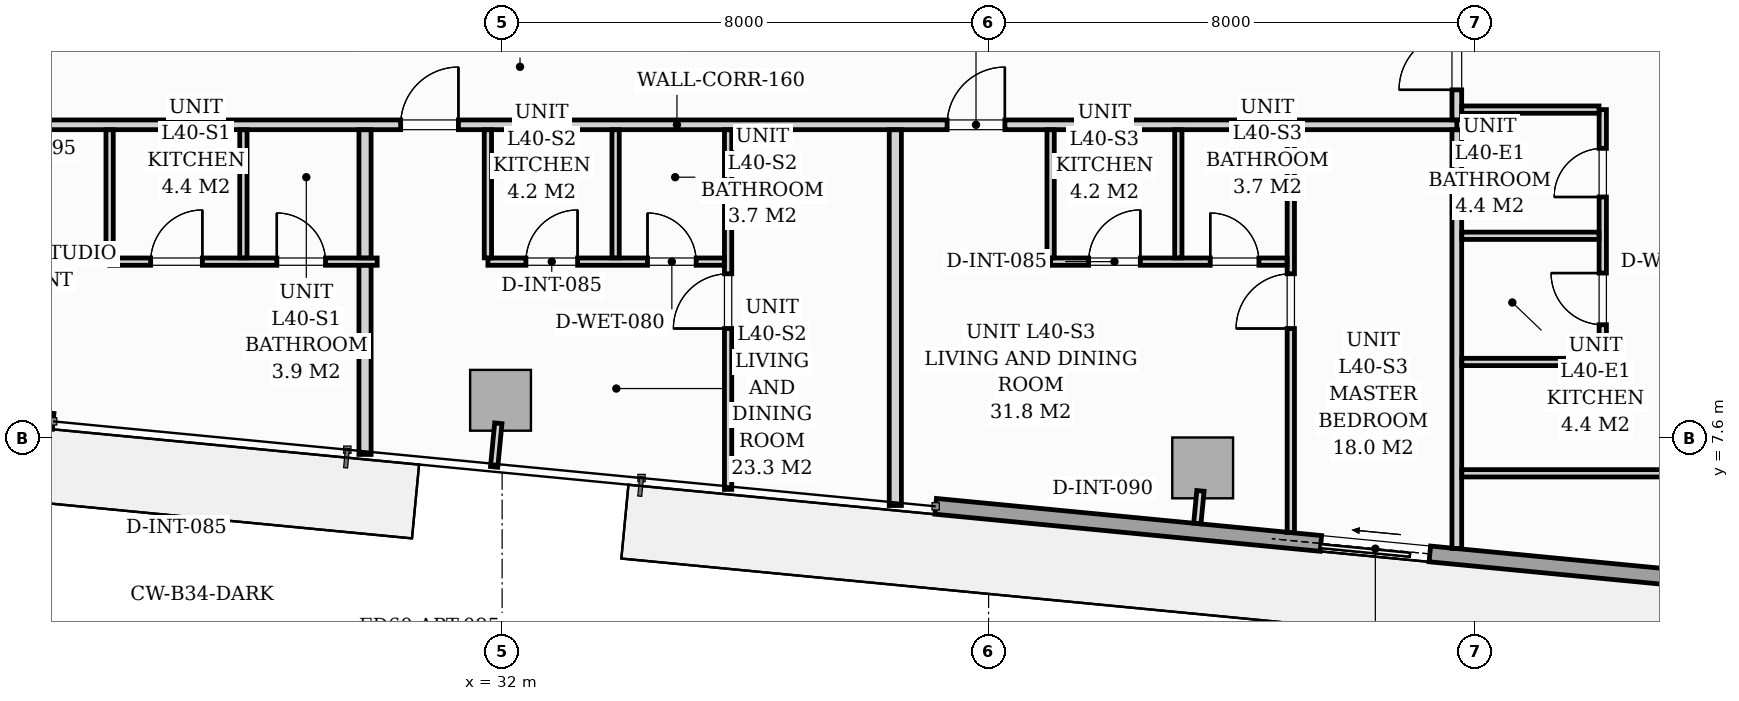
"""IFC4 building model, lengths in metres.
Left out: names, types, materials, properties, quantities, classifications, styles, units other than length and angle.
Written with IfcOpenShell. Run it as: python <this file> out.ifc"""

import sys

from ifc_helpers import new_model, si_unit, direction, frame, frame_2d, origin, origin_2d, place, context, subcontext, project, spatial, rectangle, extrude, source, transform, mapped, element, fill, save


model = new_model("IFC4")
c1 = context("Model", 3, precision=1e-05, world=origin(), true_north=direction((0.0, 1.0)))
c2 = subcontext(c1, "Body", "Model", "MODEL_VIEW")
j1 = project(units=[si_unit("LENGTHUNIT", "METRE"), si_unit("PLANEANGLEUNIT", "RADIAN")], contexts=[c1])
p1 = place(None, origin())
s1 = spatial("IfcSite", under=j1, at=p1, CompositionType="ELEMENT")
p2 = place(p1, origin())
s2 = spatial("IfcBuilding", under=s1, at=p2, CompositionType="ELEMENT")
p3 = place(p2, frame((0.0, 0.0, 140.6)))
s3 = spatial("IfcBuildingStorey", under=s2, at=p3, CompositionType="ELEMENT", Elevation=140.6)
m1 = source(origin(), c2, "Body", "SweptSolid", [
    extrude(rectangle(XDim=1.0, YDim=1.0, at=origin_2d()), origin(), (0.0, 0.0, 1.0), 3.196),
])
for number, where, z_axis, x_axis in (
    (1, (31.974, 8.22, 0.002), (0.0, 0.0, 1.0), (0.995, -0.096, 0.0)),
    (2, (43.521, 7.108, 0.002), (0.0, 0.0, 1.0), (0.995, -0.096, 0.0)),
):
    element("IfcColumn", number, at=place(p3, frame(where, z_axis=z_axis, x_axis=x_axis)), inside=s3, PredefinedType="COLUMN", context=c2, shape_type="MappedRepresentation", body=[
        mapped(m1, transform((0.0, 0.0, 0.0), scale=1.0)),
    ])
p4 = place(p3, frame((56.061, 4.845, 0.0), z_axis=(0.0, 0.0, 1.0), x_axis=(-0.995395976631, 0.095848055311, 0.0)))
e3 = element("IfcWall", 3, at=p4, inside=s3, PredefinedType="STANDARD", context=c2, shape_type="SweptSolid", body=[
    extrude(rectangle(XDim=17.01, YDim=0.26, at=frame_2d((8.505, 0.0))), origin(), (0.0, 0.0, 1.0), 2.94),
])
p5 = place(p4, frame((8.846, 0.0, 0.0)))
e4 = element("IfcOpeningElement", 4, at=p5, cuts=e3, PredefinedType="OPENING", context=c2, shape_type="SweptSolid", body=[
    extrude(rectangle(XDim=1.8, YDim=2.06, at=frame_2d((0.9, 1.03))), frame((0.0, 0.14, 0.0), z_axis=(0.0, -1.0, 0.0), x_axis=(1.0, 0.0, 0.0)), (0.0, 0.0, 1.0), 0.28),
])
p6 = place(p4, frame((2.05, 0.0, 0.65)))
e5 = element("IfcOpeningElement", 5, at=p6, cuts=e3, PredefinedType="OPENING", context=c2, shape_type="SweptSolid", body=[
    extrude(rectangle(XDim=1.6, YDim=1.5, at=frame_2d((0.8, 0.75))), frame((0.0, 0.14, 0.0), z_axis=(0.0, -1.0, 0.0), x_axis=(1.0, 0.0, 0.0)), (0.0, 0.0, 1.0), 0.28),
])
p7 = place(p3, frame((24.617, 7.873, 0.0), z_axis=(0.0, 0.0, 1.0), x_axis=(-0.995395976631, 0.095848055311, 0.0)))
e6 = element("IfcWall", 6, at=p7, inside=s3, PredefinedType="STANDARD", context=c2, shape_type="SweptSolid", body=[
    extrude(rectangle(XDim=17.01, YDim=0.26, at=frame_2d((8.505, 0.0))), origin(), (0.0, 0.0, 1.0), 2.94),
])
p8 = place(p7, frame((7.35, 0.0, 0.0)))
e7 = element("IfcOpeningElement", 7, at=p8, cuts=e6, PredefinedType="OPENING", context=c2, shape_type="SweptSolid", body=[
    extrude(rectangle(XDim=1.8, YDim=2.06, at=frame_2d((0.9, 1.03))), frame((0.0, 0.14, 0.0), z_axis=(0.0, -1.0, 0.0), x_axis=(1.0, 0.0, 0.0)), (0.0, 0.0, 1.0), 0.28),
])
p9 = place(p7, frame((9.7, 0.0, 0.65)))
e8 = element("IfcOpeningElement", 8, at=p9, cuts=e6, PredefinedType="OPENING", context=c2, shape_type="SweptSolid", body=[
    extrude(rectangle(XDim=1.6, YDim=1.5, at=frame_2d((0.8, 0.75))), frame((0.0, 0.14, 0.0), z_axis=(0.0, -1.0, 0.0), x_axis=(1.0, 0.0, 0.0)), (0.0, 0.0, 1.0), 0.28),
])
p10 = place(p3, frame((22.05, 12.75, 0.0), z_axis=(0.0, 0.0, 1.0), x_axis=(1.0, 0.0, 0.0)))
e9 = element("IfcWall", 9, at=p10, inside=s3, PredefinedType="PARTITIONING", context=c2, shape_type="SweptSolid", body=[
    extrude(rectangle(XDim=25.65, YDim=0.16, at=frame_2d((12.825, 0.0))), origin(), (0.0, 0.0, 1.0), 2.94),
])
p11 = place(p10, frame((1.312, 0.0, 0.0)))
e10 = element("IfcOpeningElement", 10, at=p11, cuts=e9, PredefinedType="OPENING", context=c2, shape_type="SweptSolid", body=[
    extrude(rectangle(XDim=0.95, YDim=2.06, at=frame_2d((0.475, 1.03))), frame((0.0, 0.09, 0.0), z_axis=(0.0, -1.0, 0.0), x_axis=(1.0, 0.0, 0.0)), (0.0, 0.0, 1.0), 0.18),
])
p12 = place(p10, frame((8.281, 0.0, 0.0)))
e11 = element("IfcOpeningElement", 11, at=p12, cuts=e9, PredefinedType="OPENING", context=c2, shape_type="SweptSolid", body=[
    extrude(rectangle(XDim=0.95, YDim=2.06, at=frame_2d((0.475, 1.03))), frame((0.0, 0.09, 0.0), z_axis=(0.0, -1.0, 0.0), x_axis=(1.0, 0.0, 0.0)), (0.0, 0.0, 1.0), 0.18),
])
p13 = place(p10, frame((17.268, 0.0, 0.0)))
e12 = element("IfcOpeningElement", 12, at=p13, cuts=e9, PredefinedType="OPENING", context=c2, shape_type="SweptSolid", body=[
    extrude(rectangle(XDim=0.95, YDim=2.06, at=frame_2d((0.475, 1.03))), frame((0.0, 0.09, 0.0), z_axis=(0.0, -1.0, 0.0), x_axis=(1.0, 0.0, 0.0)), (0.0, 0.0, 1.0), 0.18),
])
p14 = place(p3, frame((47.7, 5.783, 0.0), z_axis=(0.0, 0.0, 1.0), x_axis=(0.0, 1.0, 0.0)))
e13 = element("IfcWall", 13, at=p14, inside=s3, PredefinedType="PARTITIONING", context=c2, shape_type="SweptSolid", body=[
    extrude(rectangle(XDim=6.885, YDim=0.16, at=frame_2d((3.442, 0.0))), origin(), (0.0, 0.0, 1.0), 2.94),
])
p15 = place(p3, frame((47.7, 12.832, 0.0), z_axis=(0.0, 0.0, 1.0), x_axis=(0.0, 1.0, 0.0)))
e14 = element("IfcWall", 14, at=p15, inside=s3, PredefinedType="PARTITIONING", context=c2, shape_type="SweptSolid", body=[
    extrude(rectangle(XDim=7.818, YDim=0.16, at=frame_2d((3.909, 0.0))), origin(), (0.0, 0.0, 1.0), 2.94),
])
p16 = place(p15, frame((0.493, 0.0, 0.0)))
e15 = element("IfcOpeningElement", 15, at=p16, cuts=e14, PredefinedType="OPENING", context=c2, shape_type="SweptSolid", body=[
    extrude(rectangle(XDim=0.95, YDim=2.06, at=frame_2d((0.475, 1.03))), frame((0.0, 0.09, 0.0), z_axis=(0.0, -1.0, 0.0), x_axis=(1.0, 0.0, 0.0)), (0.0, 0.0, 1.0), 0.18),
])
p17 = place(p15, frame((5.313, 0.0, 0.0)))
e16 = element("IfcOpeningElement", 16, at=p17, cuts=e14, PredefinedType="OPENING", context=c2, shape_type="SweptSolid", body=[
    extrude(rectangle(XDim=0.95, YDim=2.06, at=frame_2d((0.475, 1.03))), frame((0.0, 0.09, 0.0), z_axis=(0.0, -1.0, 0.0), x_axis=(1.0, 0.0, 0.0)), (0.0, 0.0, 1.0), 0.18),
])
p18 = place(p3, frame((25.545, 10.5, 0.0), z_axis=(0.0, 0.0, 1.0), x_axis=(1.0, 0.0, 0.0)))
e17 = element("IfcWall", 17, at=p18, inside=s3, PredefinedType="PARTITIONING", context=c2, shape_type="SweptSolid", body=[
    extrude(rectangle(XDim=4.4, YDim=0.12, at=frame_2d((2.2, 0.0))), origin(), (0.0, 0.0, 1.0), 2.94),
])
p19 = place(p18, frame((0.675, 0.0, 0.0)))
e18 = element("IfcOpeningElement", 18, at=p19, cuts=e17, PredefinedType="OPENING", context=c2, shape_type="SweptSolid", body=[
    extrude(rectangle(XDim=0.85, YDim=2.05, at=frame_2d((0.425, 1.025))), frame((0.0, 0.07, 0.0), z_axis=(0.0, -1.0, 0.0), x_axis=(1.0, 0.0, 0.0)), (0.0, 0.0, 1.0), 0.14),
])
p20 = place(p18, frame((2.75, 0.0, 0.0)))
e19 = element("IfcOpeningElement", 19, at=p20, cuts=e17, PredefinedType="OPENING", context=c2, shape_type="SweptSolid", body=[
    extrude(rectangle(XDim=0.8, YDim=2.02, at=frame_2d((0.4, 1.01))), frame((0.0, 0.07, 0.0), z_axis=(0.0, -1.0, 0.0), x_axis=(1.0, 0.0, 0.0)), (0.0, 0.0, 1.0), 0.14),
])
for number, where, z_axis, x_axis in (
    (20, (25.545, 10.562, 0.0), (0.0, 0.0, 1.0), (0.0, 1.0, 0.0)),
    (21, (27.745, 10.562, 0.0), (0.0, 0.0, 1.0), (0.0, 1.0, 0.0)),
):
    element("IfcWall", number, at=place(p3, frame(where, z_axis=z_axis, x_axis=x_axis)), inside=s3, PredefinedType="PARTITIONING", context=c2, shape_type="SweptSolid", body=[
        extrude(rectangle(XDim=2.106, YDim=0.12, at=frame_2d((1.053, 0.0))), origin(), (0.0, 0.0, 1.0), 2.94),
    ])
p21 = place(p3, frame((29.745, 7.329, 0.0), z_axis=(0.0, 0.0, 1.0), x_axis=(0.0, 1.0, 0.0)))
e22 = element("IfcWall", 22, at=p21, inside=s3, PredefinedType="PARTITIONING", context=c2, shape_type="SweptSolid", body=[
    extrude(rectangle(XDim=3.109, YDim=0.2, at=frame_2d((1.554, 0.0))), origin(), (0.0, 0.0, 1.0), 2.94),
])
p22 = place(p3, frame((29.745, 10.562, 0.0), z_axis=(0.0, 0.0, 1.0), x_axis=(0.0, 1.0, 0.0)))
e23 = element("IfcWall", 23, at=p22, inside=s3, PredefinedType="PARTITIONING", context=c2, shape_type="SweptSolid", body=[
    extrude(rectangle(XDim=2.106, YDim=0.2, at=frame_2d((1.053, 0.0))), origin(), (0.0, 0.0, 1.0), 2.94),
])
p23 = place(p3, frame((35.716, 6.754, 0.0), z_axis=(0.0, 0.0, 1.0), x_axis=(0.0, 1.0, 0.0)))
e24 = element("IfcWall", 24, at=p23, inside=s3, PredefinedType="PARTITIONING", context=c2, shape_type="SweptSolid", body=[
    extrude(rectangle(XDim=5.914, YDim=0.12, at=frame_2d((2.957, 0.0))), origin(), (0.0, 0.0, 1.0), 2.94),
])
p24 = place(p23, frame((2.646, 0.0, 0.0)))
e25 = element("IfcOpeningElement", 25, at=p24, cuts=e24, PredefinedType="OPENING", context=c2, shape_type="SweptSolid", body=[
    extrude(rectangle(XDim=0.9, YDim=2.05, at=frame_2d((0.45, 1.025))), frame((0.0, 0.07, 0.0), z_axis=(0.0, -1.0, 0.0), x_axis=(1.0, 0.0, 0.0)), (0.0, 0.0, 1.0), 0.14),
])
p25 = place(p3, frame((31.766, 10.5, 0.0), z_axis=(0.0, 0.0, 1.0), x_axis=(1.0, 0.0, 0.0)))
e26 = element("IfcWall", 26, at=p25, inside=s3, PredefinedType="PARTITIONING", context=c2, shape_type="SweptSolid", body=[
    extrude(rectangle(XDim=3.888, YDim=0.12, at=frame_2d((1.944, 0.0))), origin(), (0.0, 0.0, 1.0), 2.94),
])
p26 = place(p25, frame((0.625, 0.0, 0.0)))
e27 = element("IfcOpeningElement", 27, at=p26, cuts=e26, PredefinedType="OPENING", context=c2, shape_type="SweptSolid", body=[
    extrude(rectangle(XDim=0.85, YDim=2.05, at=frame_2d((0.425, 1.025))), frame((0.0, 0.07, 0.0), z_axis=(0.0, -1.0, 0.0), x_axis=(1.0, 0.0, 0.0)), (0.0, 0.0, 1.0), 0.14),
])
p27 = place(p25, frame((2.625, 0.0, 0.0)))
e28 = element("IfcOpeningElement", 28, at=p27, cuts=e26, PredefinedType="OPENING", context=c2, shape_type="SweptSolid", body=[
    extrude(rectangle(XDim=0.8, YDim=2.02, at=frame_2d((0.4, 1.01))), frame((0.0, 0.07, 0.0), z_axis=(0.0, -1.0, 0.0), x_axis=(1.0, 0.0, 0.0)), (0.0, 0.0, 1.0), 0.14),
])
for number, where, z_axis, x_axis in (
    (29, (33.866, 10.562, 0.0), (0.0, 0.0, 1.0), (0.0, 1.0, 0.0)),
    (30, (31.766, 10.562, 0.0), (0.0, 0.0, 1.0), (0.0, 1.0, 0.0)),
):
    element("IfcWall", number, at=place(p3, frame(where, z_axis=z_axis, x_axis=x_axis)), inside=s3, PredefinedType="PARTITIONING", context=c2, shape_type="SweptSolid", body=[
        extrude(rectangle(XDim=2.106, YDim=0.12, at=frame_2d((1.053, 0.0))), origin(), (0.0, 0.0, 1.0), 2.94),
    ])
p28 = place(p3, frame((38.466, 6.49, 0.0), z_axis=(0.0, 0.0, 1.0), x_axis=(0.0, 1.0, 0.0)))
e31 = element("IfcWall", 31, at=p28, inside=s3, PredefinedType="PARTITIONING", context=c2, shape_type="SweptSolid", body=[
    extrude(rectangle(XDim=6.178, YDim=0.2, at=frame_2d((3.089, 0.0))), origin(), (0.0, 0.0, 1.0), 2.94),
])
p29 = place(p3, frame((44.97, 6.046, 0.0), z_axis=(0.0, 0.0, 1.0), x_axis=(0.0, 1.0, 0.0)))
e32 = element("IfcWall", 32, at=p29, inside=s3, PredefinedType="PARTITIONING", context=c2, shape_type="SweptSolid", body=[
    extrude(rectangle(XDim=6.622, YDim=0.12, at=frame_2d((3.311, 0.0))), origin(), (0.0, 0.0, 1.0), 2.94),
])
p30 = place(p29, frame((3.354, 0.0, 0.0)))
e33 = element("IfcOpeningElement", 33, at=p30, cuts=e32, PredefinedType="OPENING", context=c2, shape_type="SweptSolid", body=[
    extrude(rectangle(XDim=0.9, YDim=2.05, at=frame_2d((0.45, 1.025))), frame((0.0, 0.07, 0.0), z_axis=(0.0, -1.0, 0.0), x_axis=(1.0, 0.0, 0.0)), (0.0, 0.0, 1.0), 0.14),
])
p31 = place(p3, frame((41.02, 10.5, 0.0), z_axis=(0.0, 0.0, 1.0), x_axis=(1.0, 0.0, 0.0)))
e34 = element("IfcWall", 34, at=p31, inside=s3, PredefinedType="PARTITIONING", context=c2, shape_type="SweptSolid", body=[
    extrude(rectangle(XDim=3.888, YDim=0.12, at=frame_2d((1.944, 0.0))), origin(), (0.0, 0.0, 1.0), 2.94),
])
p32 = place(p31, frame((0.625, 0.0, 0.0)))
e35 = element("IfcOpeningElement", 35, at=p32, cuts=e34, PredefinedType="OPENING", context=c2, shape_type="SweptSolid", body=[
    extrude(rectangle(XDim=0.85, YDim=2.05, at=frame_2d((0.425, 1.025))), frame((0.0, 0.07, 0.0), z_axis=(0.0, -1.0, 0.0), x_axis=(1.0, 0.0, 0.0)), (0.0, 0.0, 1.0), 0.14),
])
p33 = place(p31, frame((2.625, 0.0, 0.0)))
e36 = element("IfcOpeningElement", 36, at=p33, cuts=e34, PredefinedType="OPENING", context=c2, shape_type="SweptSolid", body=[
    extrude(rectangle(XDim=0.8, YDim=2.02, at=frame_2d((0.4, 1.01))), frame((0.0, 0.07, 0.0), z_axis=(0.0, -1.0, 0.0), x_axis=(1.0, 0.0, 0.0)), (0.0, 0.0, 1.0), 0.14),
])
for number, where, z_axis, x_axis in (
    (37, (43.12, 10.562, 0.0), (0.0, 0.0, 1.0), (0.0, 1.0, 0.0)),
    (38, (41.02, 10.562, 0.0), (0.0, 0.0, 1.0), (0.0, 1.0, 0.0)),
):
    element("IfcWall", number, at=place(p3, frame(where, z_axis=z_axis, x_axis=x_axis)), inside=s3, PredefinedType="PARTITIONING", context=c2, shape_type="SweptSolid", body=[
        extrude(rectangle(XDim=2.106, YDim=0.12, at=frame_2d((1.053, 0.0))), origin(), (0.0, 0.0, 1.0), 2.94),
    ])
p34 = place(p3, frame((50.1, 8.85, 0.0), z_axis=(0.0, 0.0, 1.0), x_axis=(0.0, 1.0, 0.0)))
e39 = element("IfcWall", 39, at=p34, inside=s3, PredefinedType="PARTITIONING", context=c2, shape_type="SweptSolid", body=[
    extrude(rectangle(XDim=4.15, YDim=0.12, at=frame_2d((2.075, 0.0))), origin(), (0.0, 0.0, 1.0), 2.94),
])
p35 = place(p34, frame((0.612, 0.0, 0.0)))
e40 = element("IfcOpeningElement", 40, at=p35, cuts=e39, PredefinedType="OPENING", context=c2, shape_type="SweptSolid", body=[
    extrude(rectangle(XDim=0.85, YDim=2.05, at=frame_2d((0.425, 1.025))), frame((0.0, 0.07, 0.0), z_axis=(0.0, -1.0, 0.0), x_axis=(1.0, 0.0, 0.0)), (0.0, 0.0, 1.0), 0.14),
])
p36 = place(p34, frame((2.713, 0.0, 0.0)))
e41 = element("IfcOpeningElement", 41, at=p36, cuts=e39, PredefinedType="OPENING", context=c2, shape_type="SweptSolid", body=[
    extrude(rectangle(XDim=0.8, YDim=2.02, at=frame_2d((0.4, 1.01))), frame((0.0, 0.07, 0.0), z_axis=(0.0, -1.0, 0.0), x_axis=(1.0, 0.0, 0.0)), (0.0, 0.0, 1.0), 0.14),
])
for number, where, z_axis, x_axis in (
    (42, (47.782, 10.925, 0.0), (0.0, 0.0, 1.0), (1.0, 0.0, 0.0)),
    (43, (47.782, 8.85, 0.0), (0.0, 0.0, 1.0), (1.0, 0.0, 0.0)),
    (44, (47.782, 13.0, 0.0), (0.0, 0.0, 1.0), (1.0, 0.0, 0.0)),
):
    element("IfcWall", number, at=place(p3, frame(where, z_axis=z_axis, x_axis=x_axis)), inside=s3, PredefinedType="PARTITIONING", context=c2, shape_type="SweptSolid", body=[
        extrude(rectangle(XDim=2.256, YDim=0.12, at=frame_2d((1.128, 0.0))), origin(), (0.0, 0.0, 1.0), 2.94),
    ])
p37 = place(p3, frame((47.782, 7.019, 0.0), z_axis=(0.0, 0.0, 1.0), x_axis=(1.0, 0.0, 0.0)))
e45 = element("IfcWall", 45, at=p37, inside=s3, PredefinedType="PARTITIONING", context=c2, shape_type="SweptSolid", body=[
    extrude(rectangle(XDim=8.682, YDim=0.12, at=frame_2d((4.341, 0.0))), origin(), (0.0, 0.0, 1.0), 2.94),
])
p38 = place(p37, frame((3.916, 0.0, 0.0)))
e46 = element("IfcOpeningElement", 46, at=p38, cuts=e45, PredefinedType="OPENING", context=c2, shape_type="SweptSolid", body=[
    extrude(rectangle(XDim=0.85, YDim=2.05, at=frame_2d((0.425, 1.025))), frame((0.0, 0.07, 0.0), z_axis=(0.0, -1.0, 0.0), x_axis=(1.0, 0.0, 0.0)), (0.0, 0.0, 1.0), 0.14),
])
p39 = place(p3, frame((31.938, 7.841, 0.0), z_axis=(0.0, 0.0, 1.0), x_axis=(-0.095977354523, -0.995383517755, 0.0)))
e47 = element("IfcWall", 47, at=p39, inside=s3, PredefinedType="PARTITIONING", context=c2, shape_type="SweptSolid", body=[
    extrude(rectangle(XDim=0.72, YDim=0.12, at=frame_2d((0.36, 0.0))), origin(), (0.0, 0.0, 1.0), 2.94),
])
p40 = place(p3, frame((43.484, 6.729, 0.0), z_axis=(0.0, 0.0, 1.0), x_axis=(-0.095772948675, -0.995403205893, 0.0)))
e48 = element("IfcWall", 48, at=p40, inside=s3, PredefinedType="PARTITIONING", context=c2, shape_type="SweptSolid", body=[
    extrude(rectangle(XDim=0.538, YDim=0.12, at=frame_2d((0.269, 0.0))), origin(), (0.0, 0.0, 1.0), 2.94),
])
m2 = source(origin(), c2, "Body", "SweptSolid", [
    extrude(rectangle(XDim=1.8, YDim=2.06, at=frame_2d((0.9, 1.03))), frame((0.0, 0.025, 0.0), z_axis=(0.0, -1.0, 0.0), x_axis=(1.0, 0.0, 0.0)), (0.0, 0.0, 1.0), 0.05),
])
p41 = place(p5, origin())
e49 = element("IfcDoor", 49, at=p41, inside=s3, OperationType="SLIDING_TO_RIGHT", PredefinedType="DOOR", context=c2, shape_type="MappedRepresentation", body=[
    mapped(m2, transform((0.0, 0.0, 0.0), scale=1.0)),
])
fill(e4, e49)
m3 = source(origin(), c2, "Body", "SweptSolid", [
    extrude(rectangle(XDim=0.85, YDim=2.05, at=frame_2d((0.425, 1.025))), frame((0.0, 0.025, 0.0), z_axis=(0.0, -1.0, 0.0), x_axis=(1.0, 0.0, 0.0)), (0.0, 0.0, 1.0), 0.05),
])
p42 = place(p19, origin())
e50 = element("IfcDoor", 50, at=p42, inside=s3, OperationType="SINGLE_SWING_RIGHT", PredefinedType="DOOR", context=c2, shape_type="MappedRepresentation", body=[
    mapped(m3, transform((0.0, 0.0, 0.0), scale=1.0)),
])
fill(e18, e50)
m4 = source(origin(), c2, "Body", "SweptSolid", [
    extrude(rectangle(XDim=0.8, YDim=2.02, at=frame_2d((0.4, 1.01))), frame((0.0, 0.025, 0.0), z_axis=(0.0, -1.0, 0.0), x_axis=(1.0, 0.0, 0.0)), (0.0, 0.0, 1.0), 0.05),
])
p43 = place(p20, origin())
e51 = element("IfcDoor", 51, at=p43, inside=s3, OperationType="SINGLE_SWING_LEFT", PredefinedType="DOOR", context=c2, shape_type="MappedRepresentation", body=[
    mapped(m4, transform((0.0, 0.0, 0.0), scale=1.0)),
])
fill(e19, e51)
m5 = source(origin(), c2, "Body", "SweptSolid", [
    extrude(rectangle(XDim=0.95, YDim=2.06, at=frame_2d((0.475, 1.03))), frame((0.0, 0.025, 0.0), z_axis=(0.0, -1.0, 0.0), x_axis=(1.0, 0.0, 0.0)), (0.0, 0.0, 1.0), 0.05),
])
p44 = place(p12, origin())
e52 = element("IfcDoor", 52, at=p44, inside=s3, OperationType="SINGLE_SWING_RIGHT", PredefinedType="DOOR", context=c2, shape_type="MappedRepresentation", body=[
    mapped(m5, transform((0.0, 0.0, 0.0), scale=1.0)),
])
fill(e11, e52)
m6 = source(origin(), c2, "Body", "SweptSolid", [
    extrude(rectangle(XDim=0.9, YDim=2.05, at=frame_2d((0.45, 1.025))), frame((0.0, 0.025, 0.0), z_axis=(0.0, -1.0, 0.0), x_axis=(1.0, 0.0, 0.0)), (0.0, 0.0, 1.0), 0.05),
])
p45 = place(p24, origin())
e53 = element("IfcDoor", 53, at=p45, inside=s3, OperationType="SINGLE_SWING_LEFT", PredefinedType="DOOR", context=c2, shape_type="MappedRepresentation", body=[
    mapped(m6, transform((0.0, 0.0, 0.0), scale=1.0)),
])
fill(e25, e53)
p46 = place(p26, origin())
e54 = element("IfcDoor", 54, at=p46, inside=s3, OperationType="SINGLE_SWING_RIGHT", PredefinedType="DOOR", context=c2, shape_type="MappedRepresentation", body=[
    mapped(m3, transform((0.0, 0.0, 0.0), scale=1.0)),
])
fill(e27, e54)
p47 = place(p27, origin())
e55 = element("IfcDoor", 55, at=p47, inside=s3, OperationType="SINGLE_SWING_LEFT", PredefinedType="DOOR", context=c2, shape_type="MappedRepresentation", body=[
    mapped(m4, transform((0.0, 0.0, 0.0), scale=1.0)),
])
fill(e28, e55)
p48 = place(p13, origin())
e56 = element("IfcDoor", 56, at=p48, inside=s3, OperationType="SINGLE_SWING_RIGHT", PredefinedType="DOOR", context=c2, shape_type="MappedRepresentation", body=[
    mapped(m5, transform((0.0, 0.0, 0.0), scale=1.0)),
])
fill(e12, e56)
p49 = place(p30, origin())
e57 = element("IfcDoor", 57, at=p49, inside=s3, OperationType="SINGLE_SWING_LEFT", PredefinedType="DOOR", context=c2, shape_type="MappedRepresentation", body=[
    mapped(m6, transform((0.0, 0.0, 0.0), scale=1.0)),
])
fill(e33, e57)
p50 = place(p32, origin())
e58 = element("IfcDoor", 58, at=p50, inside=s3, OperationType="SINGLE_SWING_RIGHT", PredefinedType="DOOR", context=c2, shape_type="MappedRepresentation", body=[
    mapped(m3, transform((0.0, 0.0, 0.0), scale=1.0)),
])
fill(e35, e58)
p51 = place(p33, origin())
e59 = element("IfcDoor", 59, at=p51, inside=s3, OperationType="SINGLE_SWING_LEFT", PredefinedType="DOOR", context=c2, shape_type="MappedRepresentation", body=[
    mapped(m4, transform((0.0, 0.0, 0.0), scale=1.0)),
])
fill(e36, e59)
p52 = place(p16, origin())
e60 = element("IfcDoor", 60, at=p52, inside=s3, OperationType="SINGLE_SWING_LEFT", PredefinedType="DOOR", context=c2, shape_type="MappedRepresentation", body=[
    mapped(m5, transform((0.0, 0.0, 0.0), scale=1.0)),
])
fill(e15, e60)
p53 = place(p35, origin())
e61 = element("IfcDoor", 61, at=p53, inside=s3, OperationType="SINGLE_SWING_RIGHT", PredefinedType="DOOR", context=c2, shape_type="MappedRepresentation", body=[
    mapped(m3, transform((0.0, 0.0, 0.0), scale=1.0)),
])
fill(e40, e61)
p54 = place(p36, origin())
e62 = element("IfcDoor", 62, at=p54, inside=s3, OperationType="SINGLE_SWING_LEFT", PredefinedType="DOOR", context=c2, shape_type="MappedRepresentation", body=[
    mapped(m4, transform((0.0, 0.0, 0.0), scale=1.0)),
])
fill(e41, e62)
save(model, sys.argv[1])
